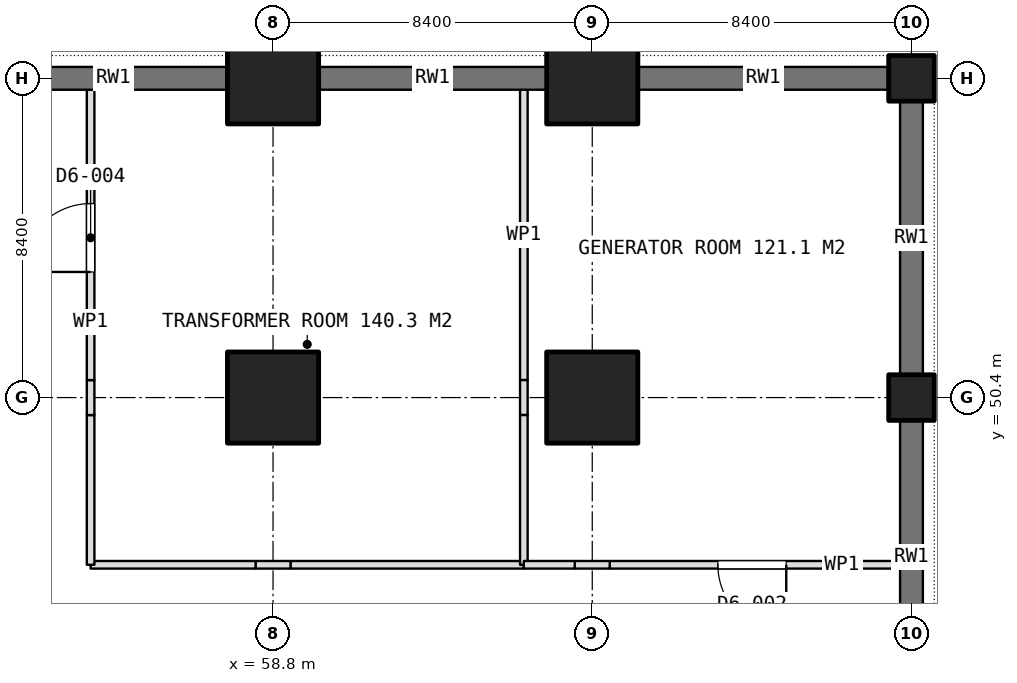
"""IFC4 building model, lengths in metres.
Left out: names, types, materials, properties, quantities, classifications, styles, units other than length and angle.
Written with IfcOpenShell. Run it as: python <this file> out.ifc"""

import sys

from ifc_helpers import new_model, si_unit, direction, frame, frame_2d, origin, origin_2d, place, context, subcontext, project, spatial, rectangle, extrude, element, fill, save


model = new_model("IFC4")
c1 = context("Model", 3, precision=1e-05, world=origin(), true_north=direction((0.0, 1.0)))
c2 = subcontext(c1, "Body", "Model", "MODEL_VIEW")
j1 = project(units=[si_unit("LENGTHUNIT", "METRE"), si_unit("PLANEANGLEUNIT", "RADIAN")], contexts=[c1])
p1 = place(None, origin())
s1 = spatial("IfcSite", under=j1, at=p1, CompositionType="ELEMENT")
p2 = place(p1, origin())
s2 = spatial("IfcBuilding", under=s1, at=p2, CompositionType="ELEMENT")
p3 = place(p2, frame((0.0, 0.0, -9.9)))
s3 = spatial("IfcBuildingStorey", under=s2, at=p3, CompositionType="ELEMENT", Elevation=-9.9)
for number, where, z_axis, x_axis in (
    (1, (58.8, 50.4, 0.0), (0.0, 0.0, 1.0), (1.0, 0.0, 0.0)),
    (2, (58.8, 58.8, 0.0), (0.0, 0.0, 1.0), (1.0, 0.0, 0.0)),
    (3, (67.2, 50.4, 0.0), (0.0, 0.0, 1.0), (1.0, 0.0, 0.0)),
    (4, (67.2, 58.8, 0.0), (0.0, 0.0, 1.0), (1.0, 0.0, 0.0)),
):
    element("IfcColumn", number, at=place(p3, frame(where, z_axis=z_axis, x_axis=x_axis)), inside=s3, PredefinedType="COLUMN", context=c2, shape_type="SweptSolid", body=[
        extrude(rectangle(XDim=2.4, YDim=2.4, at=origin_2d()), origin(), (0.0, 0.0, 1.0), 4.5),
    ])
for number, where, z_axis, x_axis in (
    (5, (75.6, 50.4, 0.0), (0.0, 0.0, 1.0), (1.0, 0.0, 0.0)),
    (6, (75.6, 58.8, 0.0), (0.0, 0.0, 1.0), (1.0, 0.0, 0.0)),
):
    element("IfcColumn", number, at=place(p3, frame(where, z_axis=z_axis, x_axis=x_axis)), inside=s3, PredefinedType="COLUMN", context=c2, shape_type="SweptSolid", body=[
        extrude(rectangle(XDim=1.2, YDim=1.2, at=origin_2d()), origin(), (0.0, 0.0, 1.0), 4.5),
    ])
for number, where, z_axis, x_axis in (
    (7, (51.6, 58.8, 0.0), (0.0, 0.0, 1.0), (1.0, 0.0, 0.0)),
    (8, (60.0, 58.8, 0.0), (0.0, 0.0, 1.0), (1.0, 0.0, 0.0)),
):
    element("IfcWall", number, at=place(p3, frame(where, z_axis=z_axis, x_axis=x_axis)), inside=s3, PredefinedType="SOLIDWALL", context=c2, shape_type="SweptSolid", body=[
        extrude(rectangle(XDim=6.0, YDim=0.6, at=frame_2d((3.0, 0.0))), origin(), (0.0, 0.0, 1.0), 4.2),
    ])
p4 = place(p3, frame((68.4, 58.8, 0.0), z_axis=(0.0, 0.0, 1.0), x_axis=(1.0, 0.0, 0.0)))
e9 = element("IfcWall", 9, at=p4, inside=s3, PredefinedType="SOLIDWALL", context=c2, shape_type="SweptSolid", body=[
    extrude(rectangle(XDim=6.6, YDim=0.6, at=frame_2d((3.3, 0.0))), origin(), (0.0, 0.0, 1.0), 4.2),
])
for number, where, z_axis, x_axis in (
    (10, (75.6, 42.6, 0.0), (0.0, 0.0, 1.0), (0.0, 1.0, 0.0)),
    (11, (75.6, 51.0, 0.0), (0.0, 0.0, 1.0), (0.0, 1.0, 0.0)),
):
    element("IfcWall", number, at=place(p3, frame(where, z_axis=z_axis, x_axis=x_axis)), inside=s3, PredefinedType="SOLIDWALL", context=c2, shape_type="SweptSolid", body=[
        extrude(rectangle(XDim=7.2, YDim=0.6, at=frame_2d((3.6, 0.0))), origin(), (0.0, 0.0, 1.0), 4.2),
    ])
p5 = place(p3, frame((65.4, 46.0, 0.0), z_axis=(0.0, 0.0, 1.0), x_axis=(-1.0, 0.0, 0.0)))
e12 = element("IfcWall", 12, at=p5, inside=s3, PredefinedType="PARTITIONING", context=c2, shape_type="SweptSolid", body=[
    extrude(rectangle(XDim=6.14, YDim=0.2, at=frame_2d((3.07, 0.0))), origin(), (0.0, 0.0, 1.0), 4.2),
])
p6 = place(p3, frame((59.26, 46.0, 0.0), z_axis=(0.0, 0.0, 1.0), x_axis=(-1.0, 0.0, 0.0)))
e13 = element("IfcWall", 13, at=p6, inside=s3, PredefinedType="PARTITIONING", context=c2, shape_type="SweptSolid", body=[
    extrude(rectangle(XDim=0.92, YDim=0.2, at=frame_2d((0.46, 0.0))), origin(), (0.0, 0.0, 1.0), 2.4),
])
p7 = place(p3, frame((58.34, 46.0, 0.0), z_axis=(0.0, 0.0, 1.0), x_axis=(-1.0, 0.0, 0.0)))
e14 = element("IfcWall", 14, at=p7, inside=s3, PredefinedType="PARTITIONING", context=c2, shape_type="SweptSolid", body=[
    extrude(rectangle(XDim=4.34, YDim=0.2, at=frame_2d((2.17, 0.0))), origin(), (0.0, 0.0, 1.0), 4.2),
])
p8 = place(p3, frame((54.0, 46.0, 0.0), z_axis=(0.0, 0.0, 1.0), x_axis=(0.0, 1.0, 0.0)))
e15 = element("IfcWall", 15, at=p8, inside=s3, PredefinedType="PARTITIONING", context=c2, shape_type="SweptSolid", body=[
    extrude(rectangle(XDim=3.94, YDim=0.2, at=frame_2d((1.97, 0.0))), origin(), (0.0, 0.0, 1.0), 4.2),
])
p9 = place(p3, frame((54.0, 49.94, 0.0), z_axis=(0.0, 0.0, 1.0), x_axis=(0.0, 1.0, 0.0)))
e16 = element("IfcWall", 16, at=p9, inside=s3, PredefinedType="PARTITIONING", context=c2, shape_type="SweptSolid", body=[
    extrude(rectangle(XDim=0.92, YDim=0.2, at=frame_2d((0.46, 0.0))), origin(), (0.0, 0.0, 1.0), 2.4),
])
p10 = place(p3, frame((54.0, 50.86, 0.0), z_axis=(0.0, 0.0, 1.0), x_axis=(0.0, 1.0, 0.0)))
e17 = element("IfcWall", 17, at=p10, inside=s3, PredefinedType="PARTITIONING", context=c2, shape_type="SweptSolid", body=[
    extrude(rectangle(XDim=7.64, YDim=0.2, at=frame_2d((3.82, 0.0))), origin(), (0.0, 0.0, 1.0), 4.2),
])
p11 = place(p10, frame((2.845, 0.0, 0.0)))
e18 = element("IfcOpeningElement", 18, at=p11, cuts=e17, PredefinedType="OPENING", context=c2, shape_type="SweptSolid", body=[
    extrude(rectangle(XDim=1.8, YDim=2.1, at=frame_2d((0.9, 1.05))), frame((0.0, 0.11, 0.0), z_axis=(0.0, -1.0, 0.0), x_axis=(1.0, 0.0, 0.0)), (0.0, 0.0, 1.0), 0.22),
])
p12 = place(p3, frame((65.4, 58.5, 0.0), z_axis=(0.0, 0.0, 1.0), x_axis=(0.0, -1.0, 0.0)))
e19 = element("IfcWall", 19, at=p12, inside=s3, PredefinedType="PARTITIONING", context=c2, shape_type="SweptSolid", body=[
    extrude(rectangle(XDim=7.64, YDim=0.2, at=frame_2d((3.82, 0.0))), origin(), (0.0, 0.0, 1.0), 4.2),
])
p13 = place(p3, frame((65.4, 50.86, 0.0), z_axis=(0.0, 0.0, 1.0), x_axis=(0.0, -1.0, 0.0)))
e20 = element("IfcWall", 20, at=p13, inside=s3, PredefinedType="PARTITIONING", context=c2, shape_type="SweptSolid", body=[
    extrude(rectangle(XDim=0.92, YDim=0.2, at=frame_2d((0.46, 0.0))), origin(), (0.0, 0.0, 1.0), 2.4),
])
p14 = place(p3, frame((65.4, 49.94, 0.0), z_axis=(0.0, 0.0, 1.0), x_axis=(0.0, -1.0, 0.0)))
e21 = element("IfcWall", 21, at=p14, inside=s3, PredefinedType="PARTITIONING", context=c2, shape_type="SweptSolid", body=[
    extrude(rectangle(XDim=3.94, YDim=0.2, at=frame_2d((1.97, 0.0))), origin(), (0.0, 0.0, 1.0), 4.2),
])
p15 = place(p3, frame((75.3, 46.0, 0.0), z_axis=(0.0, 0.0, 1.0), x_axis=(-1.0, 0.0, 0.0)))
e22 = element("IfcWall", 22, at=p15, inside=s3, PredefinedType="PARTITIONING", context=c2, shape_type="SweptSolid", body=[
    extrude(rectangle(XDim=7.64, YDim=0.2, at=frame_2d((3.82, 0.0))), origin(), (0.0, 0.0, 1.0), 4.2),
])
p16 = place(p15, frame((2.995, 0.0, 0.0)))
e23 = element("IfcOpeningElement", 23, at=p16, cuts=e22, PredefinedType="OPENING", context=c2, shape_type="SweptSolid", body=[
    extrude(rectangle(XDim=1.8, YDim=2.1, at=frame_2d((0.9, 1.05))), frame((0.0, 0.11, 0.0), z_axis=(0.0, -1.0, 0.0), x_axis=(1.0, 0.0, 0.0)), (0.0, 0.0, 1.0), 0.22),
])
p17 = place(p3, frame((67.66, 46.0, 0.0), z_axis=(0.0, 0.0, 1.0), x_axis=(-1.0, 0.0, 0.0)))
e24 = element("IfcWall", 24, at=p17, inside=s3, PredefinedType="PARTITIONING", context=c2, shape_type="SweptSolid", body=[
    extrude(rectangle(XDim=0.92, YDim=0.2, at=frame_2d((0.46, 0.0))), origin(), (0.0, 0.0, 1.0), 2.4),
])
p18 = place(p3, frame((66.74, 46.0, 0.0), z_axis=(0.0, 0.0, 1.0), x_axis=(-1.0, 0.0, 0.0)))
e25 = element("IfcWall", 25, at=p18, inside=s3, PredefinedType="PARTITIONING", context=c2, shape_type="SweptSolid", body=[
    extrude(rectangle(XDim=1.34, YDim=0.2, at=frame_2d((0.67, 0.0))), origin(), (0.0, 0.0, 1.0), 4.2),
])
p19 = place(p11, origin())
e26 = element("IfcDoor", 26, at=p19, inside=s3, OperationType="DOUBLE_DOOR_SINGLE_SWING", PredefinedType="DOOR", context=c2, shape_type="SweptSolid", body=[
    extrude(rectangle(XDim=1.8, YDim=2.1, at=frame_2d((0.9, 1.05))), frame((0.0, 0.025, 0.0), z_axis=(0.0, -1.0, 0.0), x_axis=(1.0, 0.0, 0.0)), (0.0, 0.0, 1.0), 0.05),
])
fill(e18, e26)
p20 = place(p16, origin())
e27 = element("IfcDoor", 27, at=p20, inside=s3, OperationType="DOUBLE_DOOR_SINGLE_SWING", PredefinedType="DOOR", context=c2, shape_type="SweptSolid", body=[
    extrude(rectangle(XDim=1.8, YDim=2.1, at=frame_2d((0.9, 1.05))), frame((0.0, 0.025, 0.0), z_axis=(0.0, -1.0, 0.0), x_axis=(1.0, 0.0, 0.0)), (0.0, 0.0, 1.0), 0.05),
])
fill(e23, e27)
save(model, sys.argv[1])
